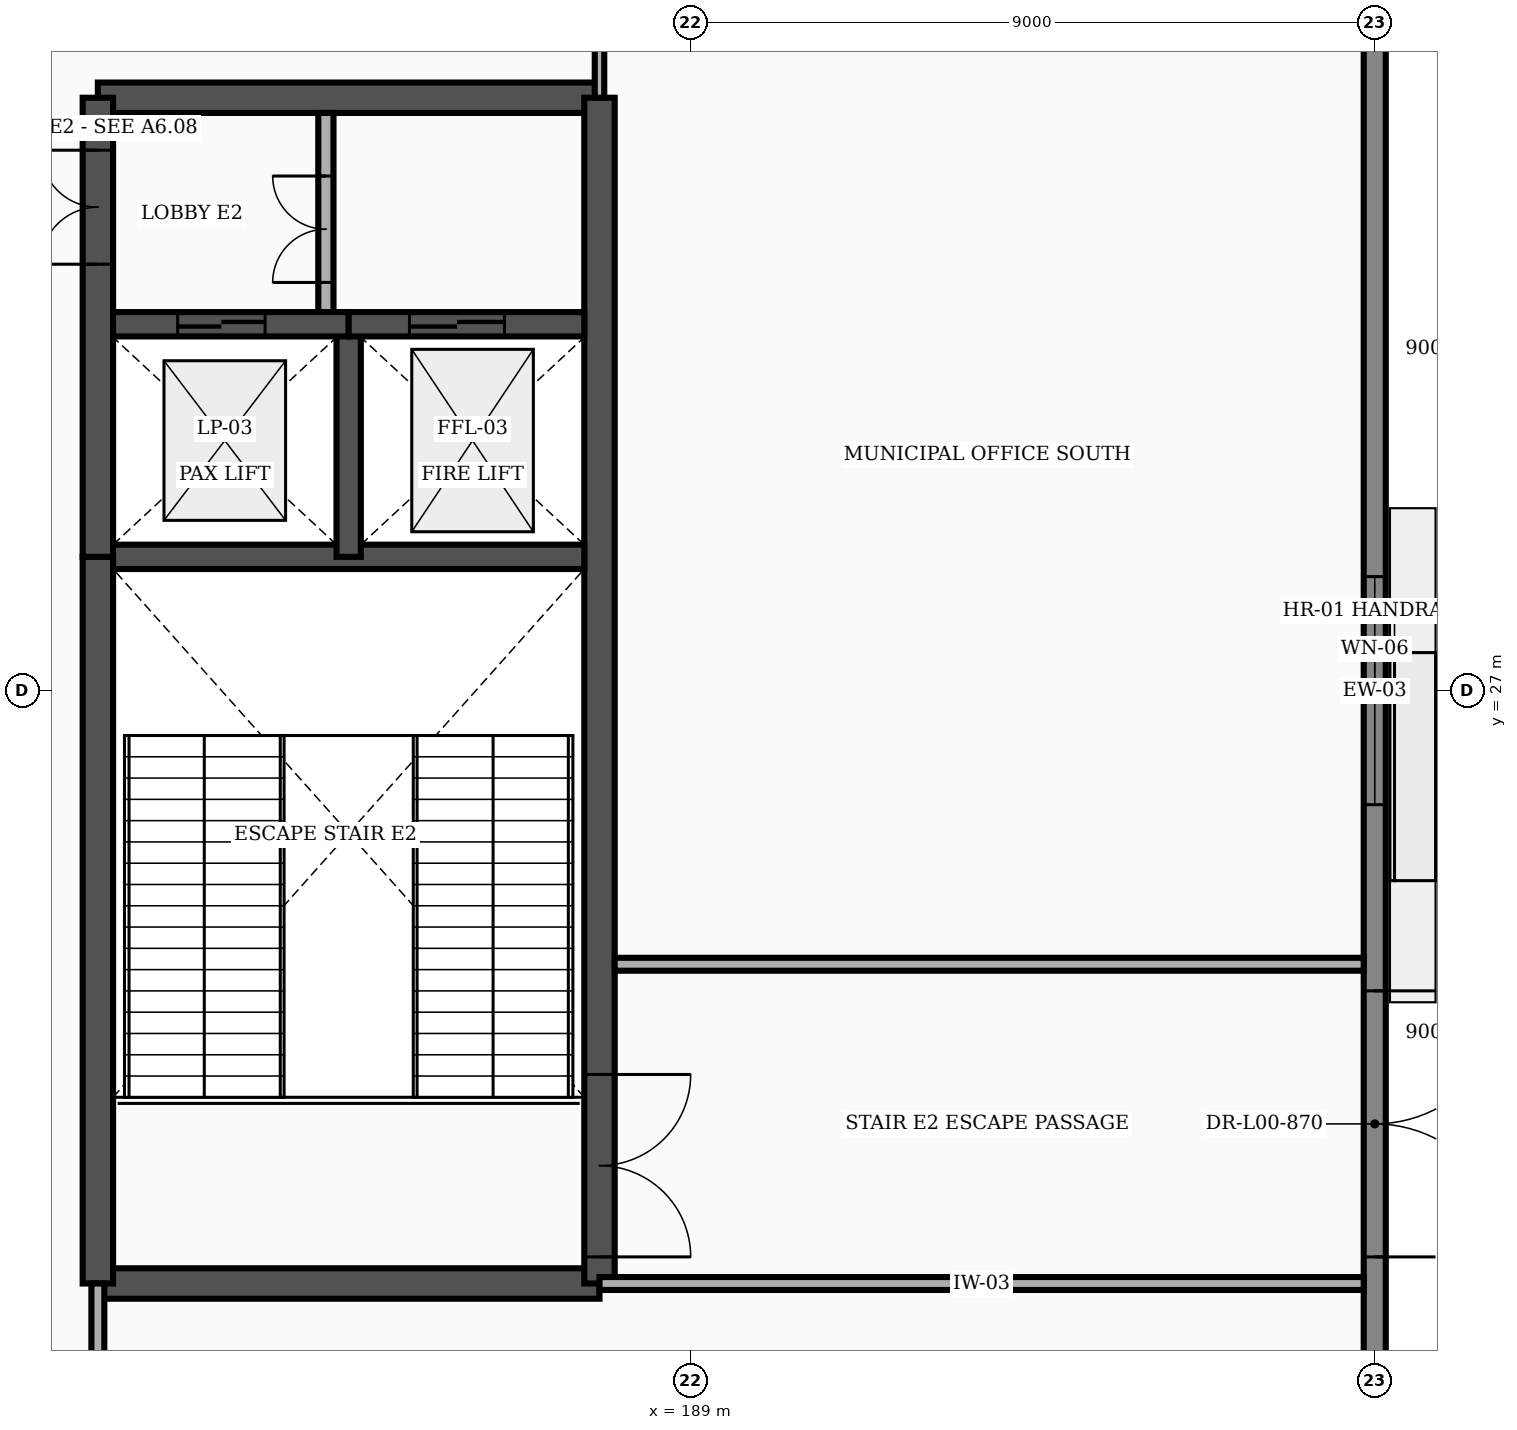
"""IFC4 building model, lengths in metres.
Left out: names, types, materials, properties, quantities, classifications, styles, units other than length and angle.
Written with IfcOpenShell. Run it as: python <this file> out.ifc"""

import sys

from ifc_helpers import new_model, si_unit, direction, frame, frame_2d, origin, place, context, subcontext, project, spatial, rectangle, extrude, element, fill, save


model = new_model("IFC4")
c1 = context("Model", 3, precision=1e-05, world=origin(), true_north=direction((0.0, 1.0)))
c2 = subcontext(c1, "Body", "Model", "MODEL_VIEW")
j1 = project(units=[si_unit("LENGTHUNIT", "METRE"), si_unit("PLANEANGLEUNIT", "RADIAN")], contexts=[c1])
p1 = place(None, origin())
s1 = spatial("IfcSite", under=j1, at=p1, CompositionType="ELEMENT")
p2 = place(p1, origin())
s2 = spatial("IfcBuilding", under=s1, at=p2, CompositionType="ELEMENT")
p3 = place(p2, origin())
s3 = spatial("IfcBuildingStorey", under=s2, at=p3, CompositionType="ELEMENT", Elevation=0.0)
p4 = place(p3, frame((198.0, 18.198, 0.0), z_axis=(0.0, 0.0, 1.0), x_axis=(0.0, 1.0, 0.0)))
e1 = element("IfcWall", 1, at=p4, inside=s3, PredefinedType="STANDARD", context=c2, shape_type="SweptSolid", body=[
    extrude(rectangle(XDim=17.603, YDim=0.29, at=frame_2d((8.802, 0.0))), origin(), (0.0, 0.0, 1.0), 5.066),
])
p5 = place(p4, frame((1.352, 0.0, 0.0)))
e2 = element("IfcOpeningElement", 2, at=p5, cuts=e1, PredefinedType="OPENING", context=c2, shape_type="SweptSolid", body=[
    extrude(rectangle(XDim=3.5, YDim=2.4, at=frame_2d((1.75, 1.2))), frame((0.0, 0.157, 0.0), z_axis=(0.0, -1.0, 0.0), x_axis=(1.0, 0.0, 0.0)), (0.0, 0.0, 1.0), 0.314),
])
p6 = place(p4, frame((7.302, 0.0, 0.85)))
e3 = element("IfcOpeningElement", 3, at=p6, cuts=e1, PredefinedType="OPENING", context=c2, shape_type="SweptSolid", body=[
    extrude(rectangle(XDim=3.0, YDim=2.6, at=frame_2d((1.5, 1.3))), frame((0.0, 0.157, 0.0), z_axis=(0.0, -1.0, 0.0), x_axis=(1.0, 0.0, 0.0)), (0.0, 0.0, 1.0), 0.314),
])
for number, where, z_axis, x_axis in (
    (4, (181.2, 19.2, 0.0), (0.0, 0.0, 1.0), (1.0, 0.0, 0.0)),
    (5, (181.2, 34.8, 0.0), (0.0, 0.0, 1.0), (1.0, 0.0, 0.0)),
):
    element("IfcWall", number, at=place(p3, frame(where, z_axis=z_axis, x_axis=x_axis)), inside=s3, PredefinedType="SHEAR", context=c2, shape_type="SweptSolid", body=[
        extrude(rectangle(XDim=6.6, YDim=0.4, at=frame_2d((3.3, 0.0))), origin(), (0.0, 0.0, 1.0), 5.75),
    ])
p7 = place(p3, frame((187.8, 19.2, 0.0), z_axis=(0.0, 0.0, 1.0), x_axis=(0.0, 1.0, 0.0)))
e6 = element("IfcWall", 6, at=p7, inside=s3, PredefinedType="SHEAR", context=c2, shape_type="SweptSolid", body=[
    extrude(rectangle(XDim=15.6, YDim=0.4, at=frame_2d((7.8, 0.0))), origin(), (0.0, 0.0, 1.0), 5.75),
])
p8 = place(p7, frame((0.35, 0.0, 0.0)))
e7 = element("IfcOpeningElement", 7, at=p8, cuts=e6, PredefinedType="OPENING", context=c2, shape_type="SweptSolid", body=[
    extrude(rectangle(XDim=2.4, YDim=2.25, at=frame_2d((1.2, 1.125))), frame((0.0, 0.212, 0.0), z_axis=(0.0, -1.0, 0.0), x_axis=(1.0, 0.0, 0.0)), (0.0, 0.0, 1.0), 0.424),
])
p9 = place(p3, frame((181.2, 19.2, 0.0), z_axis=(0.0, 0.0, 1.0), x_axis=(0.0, 1.0, 0.0)))
e8 = element("IfcWall", 8, at=p9, inside=s3, PredefinedType="SHEAR", context=c2, shape_type="SweptSolid", body=[
    extrude(rectangle(XDim=9.56, YDim=0.4, at=frame_2d((4.78, 0.0))), origin(), (0.0, 0.0, 1.0), 5.75),
])
p10 = place(p3, frame((181.2, 28.76, 0.0), z_axis=(0.0, 0.0, 1.0), x_axis=(0.0, 1.0, 0.0)))
e9 = element("IfcWall", 9, at=p10, inside=s3, PredefinedType="SHEAR", context=c2, shape_type="SweptSolid", body=[
    extrude(rectangle(XDim=6.04, YDim=0.4, at=frame_2d((3.02, 0.0))), origin(), (0.0, 0.0, 1.0), 5.75),
])
p11 = place(p10, frame((3.85, 0.0, 0.0)))
e10 = element("IfcOpeningElement", 10, at=p11, cuts=e9, PredefinedType="OPENING", context=c2, shape_type="SweptSolid", body=[
    extrude(rectangle(XDim=1.5, YDim=2.2, at=frame_2d((0.75, 1.1))), frame((0.0, 0.212, 0.0), z_axis=(0.0, -1.0, 0.0), x_axis=(1.0, 0.0, 0.0)), (0.0, 0.0, 1.0), 0.424),
])
p12 = place(p3, frame((181.4, 28.76, 0.0), z_axis=(0.0, 0.0, 1.0), x_axis=(1.0, 0.0, 0.0)))
e11 = element("IfcWall", 11, at=p12, inside=s3, PredefinedType="SHEAR", context=c2, shape_type="SweptSolid", body=[
    extrude(rectangle(XDim=6.2, YDim=0.32, at=frame_2d((3.1, 0.0))), origin(), (0.0, 0.0, 1.0), 5.75),
])
p13 = place(p3, frame((184.5, 28.76, 0.0), z_axis=(0.0, 0.0, 1.0), x_axis=(0.0, 1.0, 0.0)))
e12 = element("IfcWall", 12, at=p13, inside=s3, PredefinedType="SHEAR", context=c2, shape_type="SweptSolid", body=[
    extrude(rectangle(XDim=3.06, YDim=0.32, at=frame_2d((1.53, 0.0))), origin(), (0.0, 0.0, 1.0), 5.75),
])
p14 = place(p3, frame((184.2, 31.82, 0.0), z_axis=(0.0, 0.0, 1.0), x_axis=(0.0, 1.0, 0.0)))
e13 = element("IfcWall", 13, at=p14, inside=s3, PredefinedType="PARTITIONING", context=c2, shape_type="SweptSolid", body=[
    extrude(rectangle(XDim=2.78, YDim=0.2, at=frame_2d((1.39, 0.0))), origin(), (0.0, 0.0, 1.0), 5.75),
])
p15 = place(p14, frame((0.55, 0.0, 0.0)))
e14 = element("IfcOpeningElement", 14, at=p15, cuts=e13, PredefinedType="OPENING", context=c2, shape_type="SweptSolid", body=[
    extrude(rectangle(XDim=1.4, YDim=2.25, at=frame_2d((0.7, 1.125))), frame((0.0, 0.112, 0.0), z_axis=(0.0, -1.0, 0.0), x_axis=(1.0, 0.0, 0.0)), (0.0, 0.0, 1.0), 0.224),
])
p16 = place(p3, frame((181.4, 31.82, 0.0), z_axis=(0.0, 0.0, 1.0), x_axis=(1.0, 0.0, 0.0)))
e15 = element("IfcWall", 15, at=p16, inside=s3, PredefinedType="SHEAR", context=c2, shape_type="SweptSolid", body=[
    extrude(rectangle(XDim=3.1, YDim=0.32, at=frame_2d((1.55, 0.0))), origin(), (0.0, 0.0, 1.0), 5.75),
])
p17 = place(p16, frame((0.85, 0.0, 0.0)))
e16 = element("IfcOpeningElement", 16, at=p17, cuts=e15, PredefinedType="OPENING", context=c2, shape_type="SweptSolid", body=[
    extrude(rectangle(XDim=1.15, YDim=2.2, at=frame_2d((0.575, 1.1))), frame((0.0, 0.172, 0.0), z_axis=(0.0, -1.0, 0.0), x_axis=(1.0, 0.0, 0.0)), (0.0, 0.0, 1.0), 0.344),
])
p18 = place(p3, frame((184.5, 31.82, 0.0), z_axis=(0.0, 0.0, 1.0), x_axis=(1.0, 0.0, 0.0)))
e17 = element("IfcWall", 17, at=p18, inside=s3, PredefinedType="SHEAR", context=c2, shape_type="SweptSolid", body=[
    extrude(rectangle(XDim=3.1, YDim=0.32, at=frame_2d((1.55, 0.0))), origin(), (0.0, 0.0, 1.0), 5.75),
])
p19 = place(p18, frame((0.8, 0.0, 0.0)))
e18 = element("IfcOpeningElement", 18, at=p19, cuts=e17, PredefinedType="OPENING", context=c2, shape_type="SweptSolid", body=[
    extrude(rectangle(XDim=1.25, YDim=2.25, at=frame_2d((0.625, 1.125))), frame((0.0, 0.172, 0.0), z_axis=(0.0, -1.0, 0.0), x_axis=(1.0, 0.0, 0.0)), (0.0, 0.0, 1.0), 0.344),
])
p20 = place(p3, frame((187.8, 34.8, 0.0), z_axis=(0.0, 0.0, 1.0), x_axis=(0.0, 1.0, 0.0)))
e19 = element("IfcWall", 19, at=p20, inside=s3, PredefinedType="PARTITIONING", context=c2, shape_type="SweptSolid", body=[
    extrude(rectangle(XDim=2.0, YDim=0.125, at=frame_2d((1.0, 0.0))), origin(), (0.0, 0.0, 1.0), 5.75),
])
p21 = place(p3, frame((187.8, 19.2, 0.0), z_axis=(0.0, 0.0, 1.0), x_axis=(1.0, 0.0, 0.0)))
e20 = element("IfcWall", 20, at=p21, inside=s3, PredefinedType="PARTITIONING", context=c2, shape_type="SweptSolid", body=[
    extrude(rectangle(XDim=10.055, YDim=0.17, at=frame_2d((5.027, 0.0))), origin(), (0.0, 0.0, 1.0), 5.75),
])
p22 = place(p3, frame((181.2, 0.145, 0.0), z_axis=(0.0, 0.0, 1.0), x_axis=(0.0, 1.0, 0.0)))
e21 = element("IfcWall", 21, at=p22, inside=s3, PredefinedType="PARTITIONING", context=c2, shape_type="SweptSolid", body=[
    extrude(rectangle(XDim=19.055, YDim=0.17, at=frame_2d((9.527, 0.0))), origin(), (0.0, 0.0, 1.0), 5.75),
])
p23 = place(p22, frame((3.3, 0.0, 0.0)))
e22 = element("IfcOpeningElement", 22, at=p23, cuts=e21, PredefinedType="OPENING", context=c2, shape_type="SweptSolid", body=[
    extrude(rectangle(XDim=1.15, YDim=2.15, at=frame_2d((0.575, 1.075))), frame((0.0, 0.097, 0.0), z_axis=(0.0, -1.0, 0.0), x_axis=(1.0, 0.0, 0.0)), (0.0, 0.0, 1.0), 0.194),
])
p24 = place(p3, frame((188.0, 23.4, 0.0), z_axis=(0.0, 0.0, 1.0), x_axis=(1.0, 0.0, 0.0)))
e23 = element("IfcWall", 23, at=p24, inside=s3, PredefinedType="PARTITIONING", context=c2, shape_type="SweptSolid", body=[
    extrude(rectangle(XDim=9.855, YDim=0.17, at=frame_2d((4.927, 0.0))), origin(), (0.0, 0.0, 1.0), 5.75),
])
p25 = place(p5, frame((3.5, 0.0, 0.0), z_axis=(0.0, 0.0, 1.0), x_axis=(-1.0, 0.0, 0.0)))
e24 = element("IfcDoor", 24, at=p25, inside=s3, OperationType="DOUBLE_DOOR_SINGLE_SWING", PredefinedType="DOOR", context=c2, shape_type="SweptSolid", body=[
    extrude(rectangle(XDim=3.5, YDim=2.4, at=frame_2d((1.75, 1.2))), frame((0.0, 0.025, 0.0), z_axis=(0.0, -1.0, 0.0), x_axis=(1.0, 0.0, 0.0)), (0.0, 0.0, 1.0), 0.05),
])
fill(e2, e24)
p26 = place(p6, origin())
e25 = element("IfcWindow", 25, at=p26, inside=s3, PartitioningType="SINGLE_PANEL", PredefinedType="WINDOW", context=c2, shape_type="SweptSolid", body=[
    extrude(rectangle(XDim=3.0, YDim=2.6, at=frame_2d((1.5, 1.3))), frame((0.0, 0.03, 0.0), z_axis=(0.0, -1.0, 0.0), x_axis=(1.0, 0.0, 0.0)), (0.0, 0.0, 1.0), 0.06),
])
fill(e3, e25)
p27 = place(p8, frame((2.4, 0.0, 0.0), z_axis=(0.0, 0.0, 1.0), x_axis=(-1.0, 0.0, 0.0)))
e26 = element("IfcDoor", 26, at=p27, inside=s3, OperationType="DOUBLE_DOOR_SINGLE_SWING", PredefinedType="DOOR", context=c2, shape_type="SweptSolid", body=[
    extrude(rectangle(XDim=2.4, YDim=2.25, at=frame_2d((1.2, 1.125))), frame((0.0, 0.025, 0.0), z_axis=(0.0, -1.0, 0.0), x_axis=(1.0, 0.0, 0.0)), (0.0, 0.0, 1.0), 0.05),
])
fill(e7, e26)
p28 = place(p11, origin())
e27 = element("IfcDoor", 27, at=p28, inside=s3, OperationType="DOUBLE_DOOR_SINGLE_SWING", PredefinedType="DOOR", context=c2, shape_type="SweptSolid", body=[
    extrude(rectangle(XDim=1.5, YDim=2.2, at=frame_2d((0.75, 1.1))), frame((0.0, 0.025, 0.0), z_axis=(0.0, -1.0, 0.0), x_axis=(1.0, 0.0, 0.0)), (0.0, 0.0, 1.0), 0.05),
])
fill(e10, e27)
p29 = place(p15, origin())
e28 = element("IfcDoor", 28, at=p29, inside=s3, OperationType="DOUBLE_DOOR_SINGLE_SWING", PredefinedType="DOOR", context=c2, shape_type="SweptSolid", body=[
    extrude(rectangle(XDim=1.4, YDim=2.25, at=frame_2d((0.7, 1.125))), frame((0.0, 0.025, 0.0), z_axis=(0.0, -1.0, 0.0), x_axis=(1.0, 0.0, 0.0)), (0.0, 0.0, 1.0), 0.05),
])
fill(e14, e28)
p30 = place(p17, origin())
e29 = element("IfcDoor", 29, at=p30, inside=s3, OperationType="DOUBLE_DOOR_SLIDING", PredefinedType="DOOR", context=c2, shape_type="SweptSolid", body=[
    extrude(rectangle(XDim=1.15, YDim=2.2, at=frame_2d((0.575, 1.1))), frame((0.0, 0.025, 0.0), z_axis=(0.0, -1.0, 0.0), x_axis=(1.0, 0.0, 0.0)), (0.0, 0.0, 1.0), 0.05),
])
fill(e16, e29)
p31 = place(p19, origin())
e30 = element("IfcDoor", 30, at=p31, inside=s3, OperationType="DOUBLE_DOOR_SLIDING", PredefinedType="DOOR", context=c2, shape_type="SweptSolid", body=[
    extrude(rectangle(XDim=1.25, YDim=2.25, at=frame_2d((0.625, 1.125))), frame((0.0, 0.025, 0.0), z_axis=(0.0, -1.0, 0.0), x_axis=(1.0, 0.0, 0.0)), (0.0, 0.0, 1.0), 0.05),
])
fill(e18, e30)
save(model, sys.argv[1])
